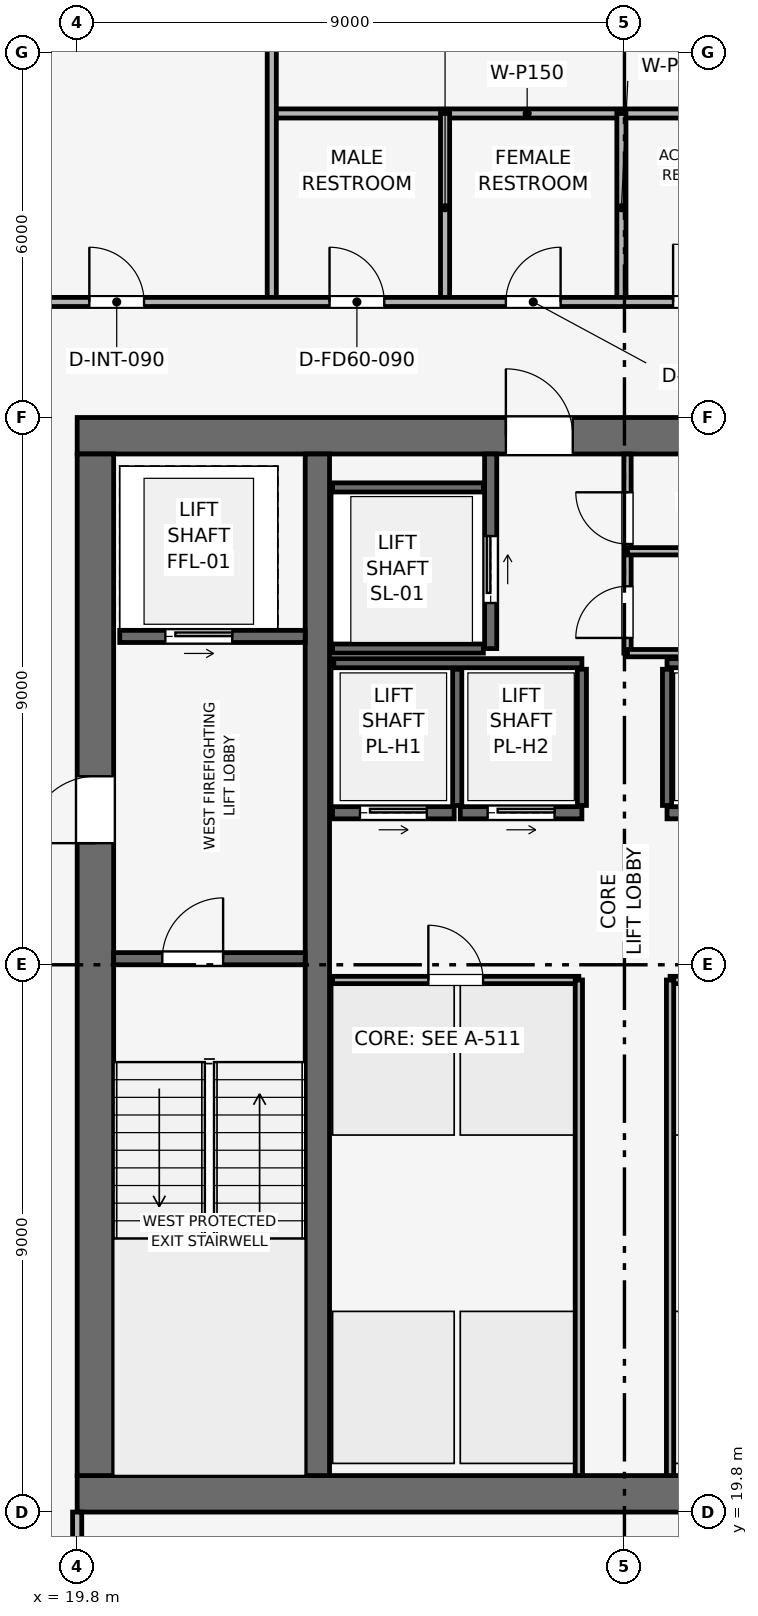
"""IFC4 building model, lengths in metres.
Left out: names, types, materials, properties, quantities, classifications, styles, units other than length and angle.
Written with IfcOpenShell. Run it as: python <this file> out.ifc"""

import sys

from ifc_helpers import new_model, si_unit, direction, frame, frame_2d, origin, place, context, subcontext, project, spatial, rectangle, extrude, element, fill, save


model = new_model("IFC4")
c1 = context("Model", 3, precision=1e-05, world=origin(), true_north=direction((0.0, 1.0)))
c2 = subcontext(c1, "Body", "Model", "MODEL_VIEW")
j1 = project(units=[si_unit("LENGTHUNIT", "METRE"), si_unit("PLANEANGLEUNIT", "RADIAN")], contexts=[c1])
p1 = place(None, origin())
s1 = spatial("IfcSite", under=j1, at=p1, CompositionType="ELEMENT")
p2 = place(p1, origin())
s2 = spatial("IfcBuilding", under=s1, at=p2, CompositionType="ELEMENT")
p3 = place(p2, frame((0.0, 0.0, 340.5)))
s3 = spatial("IfcBuildingStorey", under=s2, at=p3, CompositionType="ELEMENT", Elevation=340.5)
p4 = place(p3, frame((19.8, 20.1, 0.0), z_axis=(0.0, 0.0, 1.0), x_axis=(1.0, 0.0, 0.0)))
e1 = element("IfcWall", 1, at=p4, inside=s3, PredefinedType="SHEAR", context=c2, shape_type="SweptSolid", body=[
    extrude(rectangle(XDim=18.0, YDim=0.6, at=frame_2d((9.0, 0.0))), origin(), (0.0, 0.0, 1.0), 3.75),
])
p5 = place(p3, frame((19.8, 37.5, 0.0), z_axis=(0.0, 0.0, 1.0), x_axis=(1.0, 0.0, 0.0)))
e2 = element("IfcWall", 2, at=p5, inside=s3, PredefinedType="SHEAR", context=c2, shape_type="SweptSolid", body=[
    extrude(rectangle(XDim=18.0, YDim=0.6, at=frame_2d((9.0, 0.0))), origin(), (0.0, 0.0, 1.0), 3.75),
])
p6 = place(p5, frame((7.05, 0.0, 0.0)))
e3 = element("IfcOpeningElement", 3, at=p6, cuts=e2, PredefinedType="OPENING", context=c2, shape_type="SweptSolid", body=[
    extrude(rectangle(XDim=1.1, YDim=2.15, at=frame_2d((0.55, 1.075))), frame((0.0, 0.31, 0.0), z_axis=(0.0, -1.0, 0.0), x_axis=(1.0, 0.0, 0.0)), (0.0, 0.0, 1.0), 0.62),
])
p7 = place(p3, frame((20.1, 20.4, 0.0), z_axis=(0.0, 0.0, 1.0), x_axis=(0.0, 1.0, 0.0)))
e4 = element("IfcWall", 4, at=p7, inside=s3, PredefinedType="SHEAR", context=c2, shape_type="SweptSolid", body=[
    extrude(rectangle(XDim=16.8, YDim=0.6, at=frame_2d((8.4, 0.0))), origin(), (0.0, 0.0, 1.0), 3.75),
])
p8 = place(p7, frame((10.4, 0.0, 0.0)))
e5 = element("IfcOpeningElement", 5, at=p8, cuts=e4, PredefinedType="OPENING", context=c2, shape_type="SweptSolid", body=[
    extrude(rectangle(XDim=1.1, YDim=2.15, at=frame_2d((0.55, 1.075))), frame((0.0, 0.31, 0.0), z_axis=(0.0, -1.0, 0.0), x_axis=(1.0, 0.0, 0.0)), (0.0, 0.0, 1.0), 0.62),
])
p9 = place(p3, frame((23.75, 20.4, 0.0), z_axis=(0.0, 0.0, 1.0), x_axis=(0.0, 1.0, 0.0)))
e6 = element("IfcWall", 6, at=p9, inside=s3, PredefinedType="SHEAR", context=c2, shape_type="SweptSolid", body=[
    extrude(rectangle(XDim=16.8, YDim=0.4, at=frame_2d((8.4, 0.0))), origin(), (0.0, 0.0, 1.0), 3.75),
])
p10 = place(p3, frame((20.4, 28.9, 0.0), z_axis=(0.0, 0.0, 1.0), x_axis=(1.0, 0.0, 0.0)))
e7 = element("IfcWall", 7, at=p10, inside=s3, PredefinedType="SHEAR", context=c2, shape_type="SweptSolid", body=[
    extrude(rectangle(XDim=3.15, YDim=0.2, at=frame_2d((1.575, 0.0))), origin(), (0.0, 0.0, 1.0), 3.51),
])
p11 = place(p10, frame((0.8, 0.0, 0.0)))
e8 = element("IfcOpeningElement", 8, at=p11, cuts=e7, PredefinedType="OPENING", context=c2, shape_type="SweptSolid", body=[
    extrude(rectangle(XDim=1.0, YDim=2.1, at=frame_2d((0.5, 1.05))), frame((0.0, 0.11, 0.0), z_axis=(0.0, -1.0, 0.0), x_axis=(1.0, 0.0, 0.0)), (0.0, 0.0, 1.0), 0.22),
])
p12 = place(p3, frame((20.5, 34.2, 0.0), z_axis=(0.0, 0.0, 1.0), x_axis=(1.0, 0.0, 0.0)))
e9 = element("IfcWall", 9, at=p12, inside=s3, PredefinedType="SHEAR", context=c2, shape_type="SweptSolid", body=[
    extrude(rectangle(XDim=3.05, YDim=0.2, at=frame_2d((1.525, 0.0))), origin(), (0.0, 0.0, 1.0), 3.51),
])
p13 = place(p12, frame((0.75, 0.0, 0.0)))
e10 = element("IfcOpeningElement", 10, at=p13, cuts=e9, PredefinedType="OPENING", context=c2, shape_type="SweptSolid", body=[
    extrude(rectangle(XDim=1.1, YDim=2.15, at=frame_2d((0.55, 1.075))), frame((0.0, 0.11, 0.0), z_axis=(0.0, -1.0, 0.0), x_axis=(1.0, 0.0, 0.0)), (0.0, 0.0, 1.0), 0.22),
])
p14 = place(p3, frame((26.6, 34.0, 0.0), z_axis=(0.0, 0.0, 1.0), x_axis=(0.0, 1.0, 0.0)))
e11 = element("IfcWall", 11, at=p14, inside=s3, PredefinedType="SHEAR", context=c2, shape_type="SweptSolid", body=[
    extrude(rectangle(XDim=3.2, YDim=0.2, at=frame_2d((1.6, 0.0))), origin(), (0.0, 0.0, 1.0), 3.51),
])
p15 = place(p14, frame((0.75, 0.0, 0.0)))
e12 = element("IfcOpeningElement", 12, at=p15, cuts=e11, PredefinedType="OPENING", context=c2, shape_type="SweptSolid", body=[
    extrude(rectangle(XDim=1.1, YDim=2.15, at=frame_2d((0.55, 1.075))), frame((0.0, 0.11, 0.0), z_axis=(0.0, -1.0, 0.0), x_axis=(1.0, 0.0, 0.0)), (0.0, 0.0, 1.0), 0.22),
])
for number, where, z_axis, x_axis in (
    (13, (24.0, 34.0, 0.0), (0.0, 0.0, 1.0), (1.0, 0.0, 0.0)),
    (14, (24.0, 36.65, 0.0), (0.0, 0.0, 1.0), (1.0, 0.0, 0.0)),
):
    element("IfcWall", number, at=place(p3, frame(where, z_axis=z_axis, x_axis=x_axis)), inside=s3, PredefinedType="SHEAR", context=c2, shape_type="SweptSolid", body=[
        extrude(rectangle(XDim=2.48, YDim=0.15, at=frame_2d((1.24, 0.0))), origin(), (0.0, 0.0, 1.0), 3.51),
    ])
p16 = place(p3, frame((24.0, 31.3, 0.0), z_axis=(0.0, 0.0, 1.0), x_axis=(1.0, 0.0, 0.0)))
e15 = element("IfcWall", 15, at=p16, inside=s3, PredefinedType="SHEAR", context=c2, shape_type="SweptSolid", body=[
    extrude(rectangle(XDim=2.0, YDim=0.2, at=frame_2d((1.0, 0.0))), origin(), (0.0, 0.0, 1.0), 3.51),
])
p17 = place(p16, frame((0.45, 0.0, 0.0)))
e16 = element("IfcOpeningElement", 16, at=p17, cuts=e15, PredefinedType="OPENING", context=c2, shape_type="SweptSolid", body=[
    extrude(rectangle(XDim=1.1, YDim=2.15, at=frame_2d((0.55, 1.075))), frame((0.0, 0.11, 0.0), z_axis=(0.0, -1.0, 0.0), x_axis=(1.0, 0.0, 0.0)), (0.0, 0.0, 1.0), 0.22),
])
p18 = place(p3, frame((26.1, 31.3, 0.0), z_axis=(0.0, 0.0, 1.0), x_axis=(1.0, 0.0, 0.0)))
e17 = element("IfcWall", 17, at=p18, inside=s3, PredefinedType="SHEAR", context=c2, shape_type="SweptSolid", body=[
    extrude(rectangle(XDim=2.0, YDim=0.2, at=frame_2d((1.0, 0.0))), origin(), (0.0, 0.0, 1.0), 3.51),
])
p19 = place(p18, frame((0.45, 0.0, 0.0)))
e18 = element("IfcOpeningElement", 18, at=p19, cuts=e17, PredefinedType="OPENING", context=c2, shape_type="SweptSolid", body=[
    extrude(rectangle(XDim=1.1, YDim=2.15, at=frame_2d((0.55, 1.075))), frame((0.0, 0.11, 0.0), z_axis=(0.0, -1.0, 0.0), x_axis=(1.0, 0.0, 0.0)), (0.0, 0.0, 1.0), 0.22),
])
p20 = place(p3, frame((29.5, 31.3, 0.0), z_axis=(0.0, 0.0, 1.0), x_axis=(1.0, 0.0, 0.0)))
e19 = element("IfcWall", 19, at=p20, inside=s3, PredefinedType="SHEAR", context=c2, shape_type="SweptSolid", body=[
    extrude(rectangle(XDim=2.0, YDim=0.2, at=frame_2d((1.0, 0.0))), origin(), (0.0, 0.0, 1.0), 3.51),
])
p21 = place(p20, frame((0.45, 0.0, 0.0)))
e20 = element("IfcOpeningElement", 20, at=p21, cuts=e19, PredefinedType="OPENING", context=c2, shape_type="SweptSolid", body=[
    extrude(rectangle(XDim=1.1, YDim=2.15, at=frame_2d((0.55, 1.075))), frame((0.0, 0.11, 0.0), z_axis=(0.0, -1.0, 0.0), x_axis=(1.0, 0.0, 0.0)), (0.0, 0.0, 1.0), 0.22),
])
for number, where, z_axis, x_axis in (
    (21, (24.02, 33.76, 0.0), (0.0, 0.0, 1.0), (1.0, 0.0, 0.0)),
    (22, (29.5, 33.76, 0.0), (0.0, 0.0, 1.0), (1.0, 0.0, 0.0)),
):
    element("IfcWall", number, at=place(p3, frame(where, z_axis=z_axis, x_axis=x_axis)), inside=s3, PredefinedType="SHEAR", context=c2, shape_type="SweptSolid", body=[
        extrude(rectangle(XDim=4.08, YDim=0.15, at=frame_2d((2.04, 0.0))), origin(), (0.0, 0.0, 1.0), 3.51),
    ])
for number, where, z_axis, x_axis in (
    (23, (26.05, 31.42, 0.0), (0.0, 0.0, 1.0), (0.0, 1.0, 0.0)),
    (24, (28.1, 31.42, 0.0), (0.0, 0.0, 1.0), (0.0, 1.0, 0.0)),
    (25, (29.5, 31.42, 0.0), (0.0, 0.0, 1.0), (0.0, 1.0, 0.0)),
):
    element("IfcWall", number, at=place(p3, frame(where, z_axis=z_axis, x_axis=x_axis)), inside=s3, PredefinedType="SHEAR", context=c2, shape_type="SweptSolid", body=[
        extrude(rectangle(XDim=2.24, YDim=0.15, at=frame_2d((1.12, 0.0))), origin(), (0.0, 0.0, 1.0), 3.51),
    ])
p22 = place(p3, frame((28.85, 33.925, 0.0), z_axis=(0.0, 0.0, 1.0), x_axis=(0.0, 1.0, 0.0)))
e26 = element("IfcWall", 26, at=p22, inside=s3, PredefinedType="PARTITIONING", context=c2, shape_type="SweptSolid", body=[
    extrude(rectangle(XDim=3.275, YDim=0.12, at=frame_2d((1.637, 0.0))), origin(), (0.0, 0.0, 1.0), 3.51),
])
p23 = place(p22, frame((0.25, 0.0, 0.0)))
e27 = element("IfcOpeningElement", 27, at=p23, cuts=e26, PredefinedType="OPENING", context=c2, shape_type="SweptSolid", body=[
    extrude(rectangle(XDim=0.85, YDim=2.1, at=frame_2d((0.425, 1.05))), frame((0.0, 0.07, 0.0), z_axis=(0.0, -1.0, 0.0), x_axis=(1.0, 0.0, 0.0)), (0.0, 0.0, 1.0), 0.14),
])
p24 = place(p22, frame((1.795, 0.0, 0.0)))
e28 = element("IfcOpeningElement", 28, at=p24, cuts=e26, PredefinedType="OPENING", context=c2, shape_type="SweptSolid", body=[
    extrude(rectangle(XDim=0.85, YDim=2.1, at=frame_2d((0.425, 1.05))), frame((0.0, 0.07, 0.0), z_axis=(0.0, -1.0, 0.0), x_axis=(1.0, 0.0, 0.0)), (0.0, 0.0, 1.0), 0.14),
])
for number, where, z_axis, x_axis in (
    (29, (28.85, 35.6, 0.0), (0.0, 0.0, 1.0), (1.0, 0.0, 0.0)),
    (30, (28.85, 33.925, 0.0), (0.0, 0.0, 1.0), (1.0, 0.0, 0.0)),
):
    element("IfcWall", number, at=place(p3, frame(where, z_axis=z_axis, x_axis=x_axis)), inside=s3, PredefinedType="PARTITIONING", context=c2, shape_type="SweptSolid", body=[
        extrude(rectangle(XDim=3.3, YDim=0.12, at=frame_2d((1.65, 0.0))), origin(), (0.0, 0.0, 1.0), 3.51),
    ])
p25 = place(p3, frame((24.0, 28.55, 0.0), z_axis=(0.0, 0.0, 1.0), x_axis=(1.0, 0.0, 0.0)))
e31 = element("IfcWall", 31, at=p25, inside=s3, PredefinedType="PARTITIONING", context=c2, shape_type="SweptSolid", body=[
    extrude(rectangle(XDim=4.05, YDim=0.12, at=frame_2d((2.025, 0.0))), origin(), (0.0, 0.0, 1.0), 3.51),
])
p26 = place(p25, frame((1.575, 0.0, 0.0)))
e32 = element("IfcOpeningElement", 32, at=p26, cuts=e31, PredefinedType="OPENING", context=c2, shape_type="SweptSolid", body=[
    extrude(rectangle(XDim=0.9, YDim=2.1, at=frame_2d((0.45, 1.05))), frame((0.0, 0.07, 0.0), z_axis=(0.0, -1.0, 0.0), x_axis=(1.0, 0.0, 0.0)), (0.0, 0.0, 1.0), 0.14),
])
p27 = place(p3, frame((28.05, 20.4, 0.0), z_axis=(0.0, 0.0, 1.0), x_axis=(0.0, 1.0, 0.0)))
e33 = element("IfcWall", 33, at=p27, inside=s3, PredefinedType="PARTITIONING", context=c2, shape_type="SweptSolid", body=[
    extrude(rectangle(XDim=8.15, YDim=0.12, at=frame_2d((4.075, 0.0))), origin(), (0.0, 0.0, 1.0), 3.51),
])
p28 = place(p3, frame((29.55, 28.55, 0.0), z_axis=(0.0, 0.0, 1.0), x_axis=(1.0, 0.0, 0.0)))
e34 = element("IfcWall", 34, at=p28, inside=s3, PredefinedType="PARTITIONING", context=c2, shape_type="SweptSolid", body=[
    extrude(rectangle(XDim=4.05, YDim=0.12, at=frame_2d((2.025, 0.0))), origin(), (0.0, 0.0, 1.0), 3.51),
])
p29 = place(p28, frame((1.575, 0.0, 0.0)))
e35 = element("IfcOpeningElement", 35, at=p29, cuts=e34, PredefinedType="OPENING", context=c2, shape_type="SweptSolid", body=[
    extrude(rectangle(XDim=0.9, YDim=2.1, at=frame_2d((0.45, 1.05))), frame((0.0, 0.07, 0.0), z_axis=(0.0, -1.0, 0.0), x_axis=(1.0, 0.0, 0.0)), (0.0, 0.0, 1.0), 0.14),
])
p30 = place(p3, frame((29.55, 20.4, 0.0), z_axis=(0.0, 0.0, 1.0), x_axis=(0.0, 1.0, 0.0)))
e36 = element("IfcWall", 36, at=p30, inside=s3, PredefinedType="PARTITIONING", context=c2, shape_type="SweptSolid", body=[
    extrude(rectangle(XDim=8.15, YDim=0.12, at=frame_2d((4.075, 0.0))), origin(), (0.0, 0.0, 1.0), 3.51),
])
p31 = place(p3, frame((23.0, 42.8, 0.0), z_axis=(0.0, 0.0, 1.0), x_axis=(1.0, 0.0, 0.0)))
e37 = element("IfcWall", 37, at=p31, inside=s3, PredefinedType="PARTITIONING", context=c2, shape_type="SweptSolid", body=[
    extrude(rectangle(XDim=8.4, YDim=0.15, at=frame_2d((4.2, 0.0))), origin(), (0.0, 0.0, 1.0), 3.095),
])
p32 = place(p3, frame((23.0, 39.7, 0.0), z_axis=(0.0, 0.0, 1.0), x_axis=(0.0, 1.0, 0.0)))
e38 = element("IfcWall", 38, at=p32, inside=s3, PredefinedType="PARTITIONING", context=c2, shape_type="SweptSolid", body=[
    extrude(rectangle(XDim=11.17, YDim=0.15, at=frame_2d((5.585, 0.0))), origin(), (0.0, 0.0, 1.0), 3.135),
])
p33 = place(p32, frame((6.685, 0.0, 0.0)))
e39 = element("IfcOpeningElement", 39, at=p33, cuts=e38, PredefinedType="OPENING", context=c2, shape_type="SweptSolid", body=[
    extrude(rectangle(XDim=0.9, YDim=2.1, at=frame_2d((0.45, 1.05))), frame((0.0, 0.085, 0.0), z_axis=(0.0, -1.0, 0.0), x_axis=(1.0, 0.0, 0.0)), (0.0, 0.0, 1.0), 0.17),
])
p34 = place(p3, frame((25.85, 39.7, 0.0), z_axis=(0.0, 0.0, 1.0), x_axis=(0.0, 1.0, 0.0)))
e40 = element("IfcWall", 40, at=p34, inside=s3, PredefinedType="PARTITIONING", context=c2, shape_type="SweptSolid", body=[
    extrude(rectangle(XDim=3.1, YDim=0.15, at=frame_2d((1.55, 0.0))), origin(), (0.0, 0.0, 1.0), 3.135),
])
p35 = place(p3, frame((28.75, 39.7, 0.0), z_axis=(0.0, 0.0, 1.0), x_axis=(0.0, 1.0, 0.0)))
e41 = element("IfcWall", 41, at=p35, inside=s3, PredefinedType="PARTITIONING", context=c2, shape_type="SweptSolid", body=[
    extrude(rectangle(XDim=3.1, YDim=0.15, at=frame_2d((1.55, 0.0))), origin(), (0.0, 0.0, 1.0), 3.095),
])
p36 = place(p3, frame((19.8, 6.73, 0.0), z_axis=(0.0, 0.0, 1.0), x_axis=(0.0, 1.0, 0.0)))
e42 = element("IfcWall", 42, at=p36, inside=s3, PredefinedType="PARTITIONING", context=c2, shape_type="SweptSolid", body=[
    extrude(rectangle(XDim=13.07, YDim=0.15, at=frame_2d((6.535, 0.0))), origin(), (0.0, 0.0, 1.0), 3.095),
])
p37 = place(p36, frame((9.02, 0.0, 0.0)))
e43 = element("IfcOpeningElement", 43, at=p37, cuts=e42, PredefinedType="OPENING", context=c2, shape_type="SweptSolid", body=[
    extrude(rectangle(XDim=0.9, YDim=2.1, at=frame_2d((0.45, 1.05))), frame((0.0, 0.085, 0.0), z_axis=(0.0, -1.0, 0.0), x_axis=(1.0, 0.0, 0.0)), (0.0, 0.0, 1.0), 0.17),
])
p38 = place(p3, frame((17.9, 39.7, 0.0), z_axis=(0.0, 0.0, 1.0), x_axis=(1.0, 0.0, 0.0)))
e44 = element("IfcWall", 44, at=p38, inside=s3, PredefinedType="PARTITIONING", context=c2, shape_type="SweptSolid", body=[
    extrude(rectangle(XDim=21.8, YDim=0.15, at=frame_2d((10.9, 0.0))), origin(), (0.0, 0.0, 1.0), 3.095),
])
p39 = place(p38, frame((2.1, 0.0, 0.0)))
e45 = element("IfcOpeningElement", 45, at=p39, cuts=e44, PredefinedType="OPENING", context=c2, shape_type="SweptSolid", body=[
    extrude(rectangle(XDim=0.9, YDim=2.1, at=frame_2d((0.45, 1.05))), frame((0.0, 0.085, 0.0), z_axis=(0.0, -1.0, 0.0), x_axis=(1.0, 0.0, 0.0)), (0.0, 0.0, 1.0), 0.17),
])
p40 = place(p38, frame((6.05, 0.0, 0.0)))
e46 = element("IfcOpeningElement", 46, at=p40, cuts=e44, PredefinedType="OPENING", context=c2, shape_type="SweptSolid", body=[
    extrude(rectangle(XDim=0.9, YDim=2.1, at=frame_2d((0.45, 1.05))), frame((0.0, 0.085, 0.0), z_axis=(0.0, -1.0, 0.0), x_axis=(1.0, 0.0, 0.0)), (0.0, 0.0, 1.0), 0.17),
])
p41 = place(p38, frame((8.95, 0.0, 0.0)))
e47 = element("IfcOpeningElement", 47, at=p41, cuts=e44, PredefinedType="OPENING", context=c2, shape_type="SweptSolid", body=[
    extrude(rectangle(XDim=0.9, YDim=2.1, at=frame_2d((0.45, 1.05))), frame((0.0, 0.085, 0.0), z_axis=(0.0, -1.0, 0.0), x_axis=(1.0, 0.0, 0.0)), (0.0, 0.0, 1.0), 0.17),
])
p42 = place(p38, frame((11.7, 0.0, 0.0)))
e48 = element("IfcOpeningElement", 48, at=p42, cuts=e44, PredefinedType="OPENING", context=c2, shape_type="SweptSolid", body=[
    extrude(rectangle(XDim=0.95, YDim=2.1, at=frame_2d((0.475, 1.05))), frame((0.0, 0.085, 0.0), z_axis=(0.0, -1.0, 0.0), x_axis=(1.0, 0.0, 0.0)), (0.0, 0.0, 1.0), 0.17),
])
p43 = place(p38, frame((17.2, 0.0, 0.0)))
e49 = element("IfcOpeningElement", 49, at=p43, cuts=e44, PredefinedType="OPENING", context=c2, shape_type="SweptSolid", body=[
    extrude(rectangle(XDim=0.9, YDim=2.1, at=frame_2d((0.45, 1.05))), frame((0.0, 0.085, 0.0), z_axis=(0.0, -1.0, 0.0), x_axis=(1.0, 0.0, 0.0)), (0.0, 0.0, 1.0), 0.17),
])
p44 = place(p11, origin())
e50 = element("IfcDoor", 50, at=p44, inside=s3, OperationType="SINGLE_SWING_RIGHT", PredefinedType="DOOR", context=c2, shape_type="SweptSolid", body=[
    extrude(rectangle(XDim=1.0, YDim=2.1, at=frame_2d((0.5, 1.05))), frame((0.0, 0.025, 0.0), z_axis=(0.0, -1.0, 0.0), x_axis=(1.0, 0.0, 0.0)), (0.0, 0.0, 1.0), 0.05),
])
fill(e8, e50)
p45 = place(p13, origin())
e51 = element("IfcDoor", 51, at=p45, inside=s3, OperationType="SLIDING_TO_RIGHT", PredefinedType="DOOR", context=c2, shape_type="SweptSolid", body=[
    extrude(rectangle(XDim=1.1, YDim=2.15, at=frame_2d((0.55, 1.075))), frame((0.0, 0.025, 0.0), z_axis=(0.0, -1.0, 0.0), x_axis=(1.0, 0.0, 0.0)), (0.0, 0.0, 1.0), 0.05),
])
fill(e10, e51)
p46 = place(p15, origin())
e52 = element("IfcDoor", 52, at=p46, inside=s3, OperationType="SLIDING_TO_RIGHT", PredefinedType="DOOR", context=c2, shape_type="SweptSolid", body=[
    extrude(rectangle(XDim=1.1, YDim=2.15, at=frame_2d((0.55, 1.075))), frame((0.0, 0.025, 0.0), z_axis=(0.0, -1.0, 0.0), x_axis=(1.0, 0.0, 0.0)), (0.0, 0.0, 1.0), 0.05),
])
fill(e12, e52)
p47 = place(p17, origin())
e53 = element("IfcDoor", 53, at=p47, inside=s3, OperationType="SLIDING_TO_RIGHT", PredefinedType="DOOR", context=c2, shape_type="SweptSolid", body=[
    extrude(rectangle(XDim=1.1, YDim=2.15, at=frame_2d((0.55, 1.075))), frame((0.0, 0.025, 0.0), z_axis=(0.0, -1.0, 0.0), x_axis=(1.0, 0.0, 0.0)), (0.0, 0.0, 1.0), 0.05),
])
fill(e16, e53)
p48 = place(p19, origin())
e54 = element("IfcDoor", 54, at=p48, inside=s3, OperationType="SLIDING_TO_RIGHT", PredefinedType="DOOR", context=c2, shape_type="SweptSolid", body=[
    extrude(rectangle(XDim=1.1, YDim=2.15, at=frame_2d((0.55, 1.075))), frame((0.0, 0.025, 0.0), z_axis=(0.0, -1.0, 0.0), x_axis=(1.0, 0.0, 0.0)), (0.0, 0.0, 1.0), 0.05),
])
fill(e18, e54)
p49 = place(p23, origin())
e55 = element("IfcDoor", 55, at=p49, inside=s3, OperationType="SINGLE_SWING_LEFT", PredefinedType="DOOR", context=c2, shape_type="SweptSolid", body=[
    extrude(rectangle(XDim=0.85, YDim=2.1, at=frame_2d((0.425, 1.05))), frame((0.0, 0.025, 0.0), z_axis=(0.0, -1.0, 0.0), x_axis=(1.0, 0.0, 0.0)), (0.0, 0.0, 1.0), 0.05),
])
fill(e27, e55)
p50 = place(p24, origin())
e56 = element("IfcDoor", 56, at=p50, inside=s3, OperationType="SINGLE_SWING_RIGHT", PredefinedType="DOOR", context=c2, shape_type="SweptSolid", body=[
    extrude(rectangle(XDim=0.85, YDim=2.1, at=frame_2d((0.425, 1.05))), frame((0.0, 0.025, 0.0), z_axis=(0.0, -1.0, 0.0), x_axis=(1.0, 0.0, 0.0)), (0.0, 0.0, 1.0), 0.05),
])
fill(e28, e56)
p51 = place(p26, origin())
e57 = element("IfcDoor", 57, at=p51, inside=s3, OperationType="SINGLE_SWING_LEFT", PredefinedType="DOOR", context=c2, shape_type="SweptSolid", body=[
    extrude(rectangle(XDim=0.9, YDim=2.1, at=frame_2d((0.45, 1.05))), frame((0.0, 0.025, 0.0), z_axis=(0.0, -1.0, 0.0), x_axis=(1.0, 0.0, 0.0)), (0.0, 0.0, 1.0), 0.05),
])
fill(e32, e57)
p52 = place(p39, origin())
e58 = element("IfcDoor", 58, at=p52, inside=s3, OperationType="SINGLE_SWING_LEFT", PredefinedType="DOOR", context=c2, shape_type="SweptSolid", body=[
    extrude(rectangle(XDim=0.9, YDim=2.1, at=frame_2d((0.45, 1.05))), frame((0.0, 0.025, 0.0), z_axis=(0.0, -1.0, 0.0), x_axis=(1.0, 0.0, 0.0)), (0.0, 0.0, 1.0), 0.05),
])
fill(e45, e58)
p53 = place(p40, origin())
e59 = element("IfcDoor", 59, at=p53, inside=s3, OperationType="SINGLE_SWING_LEFT", PredefinedType="DOOR", context=c2, shape_type="SweptSolid", body=[
    extrude(rectangle(XDim=0.9, YDim=2.1, at=frame_2d((0.45, 1.05))), frame((0.0, 0.025, 0.0), z_axis=(0.0, -1.0, 0.0), x_axis=(1.0, 0.0, 0.0)), (0.0, 0.0, 1.0), 0.05),
])
fill(e46, e59)
p54 = place(p41, origin())
e60 = element("IfcDoor", 60, at=p54, inside=s3, OperationType="SINGLE_SWING_RIGHT", PredefinedType="DOOR", context=c2, shape_type="SweptSolid", body=[
    extrude(rectangle(XDim=0.9, YDim=2.1, at=frame_2d((0.45, 1.05))), frame((0.0, 0.025, 0.0), z_axis=(0.0, -1.0, 0.0), x_axis=(1.0, 0.0, 0.0)), (0.0, 0.0, 1.0), 0.05),
])
fill(e47, e60)
p55 = place(p42, origin())
e61 = element("IfcDoor", 61, at=p55, inside=s3, OperationType="SINGLE_SWING_LEFT", PredefinedType="DOOR", context=c2, shape_type="SweptSolid", body=[
    extrude(rectangle(XDim=0.95, YDim=2.1, at=frame_2d((0.475, 1.05))), frame((0.0, 0.025, 0.0), z_axis=(0.0, -1.0, 0.0), x_axis=(1.0, 0.0, 0.0)), (0.0, 0.0, 1.0), 0.05),
])
fill(e48, e61)
p56 = place(p8, origin())
e62 = element("IfcDoor", 62, at=p56, inside=s3, OperationType="SINGLE_SWING_LEFT", PredefinedType="DOOR", context=c2, shape_type="SweptSolid", body=[
    extrude(rectangle(XDim=1.1, YDim=2.15, at=frame_2d((0.55, 1.075))), frame((0.0, 0.025, 0.0), z_axis=(0.0, -1.0, 0.0), x_axis=(1.0, 0.0, 0.0)), (0.0, 0.0, 1.0), 0.05),
])
fill(e5, e62)
p57 = place(p6, origin())
e63 = element("IfcDoor", 63, at=p57, inside=s3, OperationType="SINGLE_SWING_LEFT", PredefinedType="DOOR", context=c2, shape_type="SweptSolid", body=[
    extrude(rectangle(XDim=1.1, YDim=2.15, at=frame_2d((0.55, 1.075))), frame((0.0, 0.025, 0.0), z_axis=(0.0, -1.0, 0.0), x_axis=(1.0, 0.0, 0.0)), (0.0, 0.0, 1.0), 0.05),
])
fill(e3, e63)
save(model, sys.argv[1])
